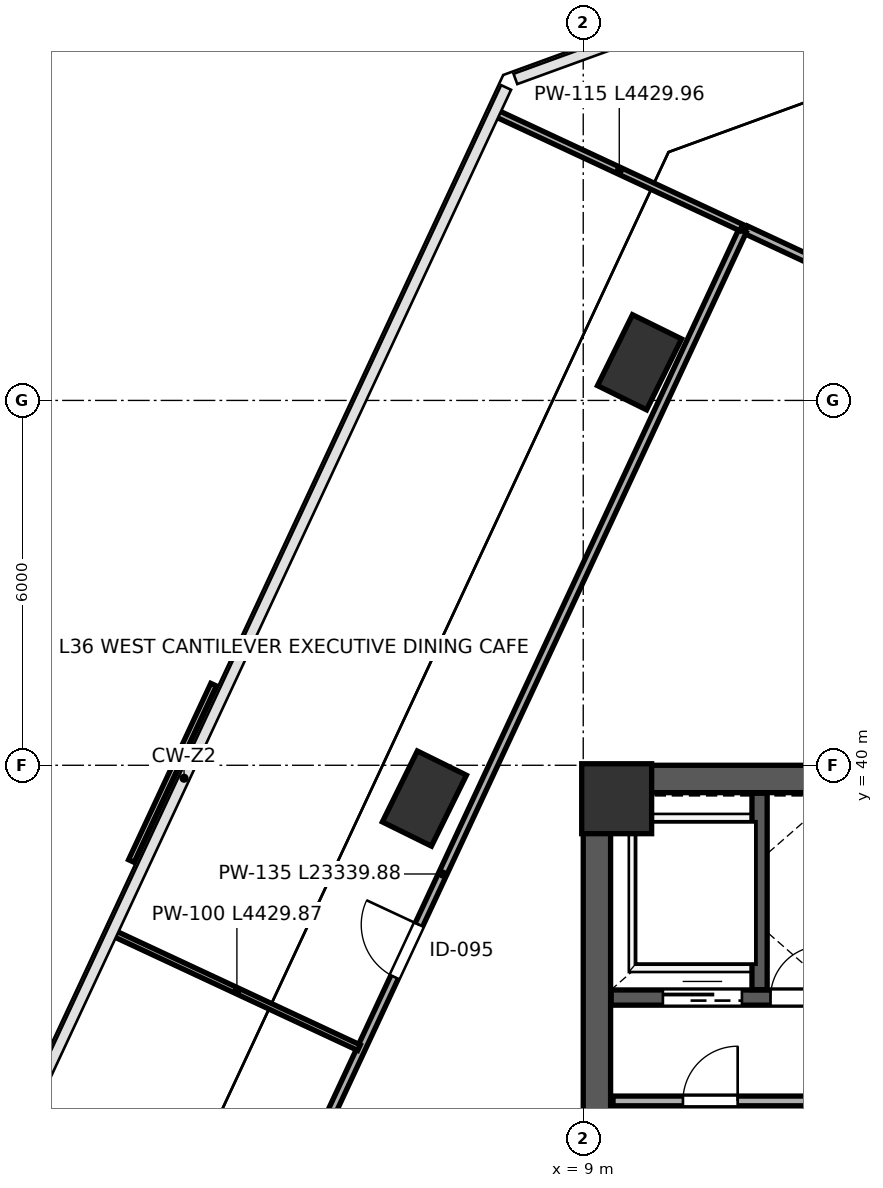
"""IFC4 building model, lengths in metres.
Left out: names, types, materials, properties, quantities, classifications, styles, units other than length and angle.
Written with IfcOpenShell. Run it as: python <this file> out.ifc"""

import sys

from ifc_helpers import new_model, si_unit, direction, frame, frame_2d, origin, origin_2d, place, context, subcontext, project, spatial, rectangle, extrude, clip, halfspace, source, transform, mapped, element, fill, save


model = new_model("IFC4")
c1 = context("Model", 3, precision=1e-05, world=origin(), true_north=direction((0.0, 1.0)))
c2 = subcontext(c1, "Body", "Model", "MODEL_VIEW")
j1 = project(units=[si_unit("LENGTHUNIT", "METRE"), si_unit("PLANEANGLEUNIT", "RADIAN")], contexts=[c1])
p1 = place(None, origin())
s1 = spatial("IfcSite", under=j1, at=p1, CompositionType="ELEMENT")
p2 = place(p1, origin())
s2 = spatial("IfcBuilding", under=s1, at=p2, CompositionType="ELEMENT")
p3 = place(p2, frame((0.0, 0.0, 162.4)))
s3 = spatial("IfcBuildingStorey", under=s2, at=p3, CompositionType="ELEMENT", Elevation=162.4)
m1 = source(origin(), c2, "Body", "SweptSolid", [
    extrude(rectangle(XDim=1.15, YDim=1.15, at=origin_2d()), origin(), (0.0, 0.0, 1.0), 4.199),
])
p4 = place(p3, frame((9.55, 39.45, 0.001), z_axis=(0.0, 0.0, 1.0), x_axis=(1.0, 0.0, 0.0)))
e1 = element("IfcColumn", 1, at=p4, inside=s3, PredefinedType="COLUMN", context=c2, shape_type="MappedRepresentation", body=[
    mapped(m1, transform((0.0, 0.0, 0.0), scale=1.0)),
])
p5 = place(p3, frame((6.388, 39.453, 0.0), z_axis=(0.039433062508, 0.077765936782, 0.99619149397), x_axis=(0.600646384242, -0.79858419972, 0.038564193941)))
e2 = element("IfcColumn", 2, at=p5, inside=s3, PredefinedType="PILASTER", context=c2, shape_type="Clipping", body=[
    clip(clip(extrude(rectangle(XDim=0.9, YDim=1.3, at=origin_2d()), origin(), (0.0, 0.0, 1.0), 4.216), halfspace(frame((0.0, 0.0, 0.069), z_axis=(0.0, 0.0, -1.0), x_axis=(1.0, 0.0, 0.0)), False)), halfspace(frame((0.0, 0.0, 4.147), z_axis=(0.0, 0.0, 1.0), x_axis=(1.0, 0.0, 0.0)), False)),
])
p6 = place(p3, frame((9.926, 46.627, 0.0), z_axis=(0.076252876943, 0.059069944885, 0.995337249564), x_axis=(0.201228472882, -0.978614892024, 0.042661397204)))
e3 = element("IfcColumn", 3, at=p6, inside=s3, PredefinedType="PILASTER", context=c2, shape_type="Clipping", body=[
    clip(clip(extrude(rectangle(XDim=0.9, YDim=1.3, at=origin_2d()), origin(), (0.0, 0.0, 1.0), 4.22), halfspace(frame((0.0, 0.0, 0.076), z_axis=(0.0, 0.0, -1.0), x_axis=(1.0, 0.0, 0.0)), False)), halfspace(frame((0.0, 0.0, 4.144), z_axis=(0.0, 0.0, 1.0), x_axis=(1.0, 0.0, 0.0)), False)),
])
p7 = place(p3, frame((9.225, 24.45, 0.0), z_axis=(0.0, 0.0, 1.0), x_axis=(0.0, 1.0, 0.0)))
e4 = element("IfcWall", 4, at=p7, inside=s3, PredefinedType="SHEAR", context=c2, shape_type="SweptSolid", body=[
    extrude(rectangle(XDim=15.1, YDim=0.45, at=frame_2d((7.55, 0.0))), origin(), (0.0, 0.0, 1.0), 3.96),
])
p8 = place(p3, frame((9.0, 39.775, 0.0), z_axis=(0.0, 0.0, 1.0), x_axis=(1.0, 0.0, 0.0)))
e5 = element("IfcWall", 5, at=p8, inside=s3, PredefinedType="SHEAR", context=c2, shape_type="SweptSolid", body=[
    extrude(rectangle(XDim=18.0, YDim=0.45, at=frame_2d((9.0, 0.0))), origin(), (0.0, 0.0, 1.0), 3.96),
])
p9 = place(p3, frame((9.46, 36.18, 0.0), z_axis=(0.0, 0.0, 1.0), x_axis=(1.0, 0.0, 0.0)))
e6 = element("IfcWall", 6, at=p9, inside=s3, PredefinedType="SHEAR", context=c2, shape_type="SweptSolid", body=[
    extrude(rectangle(XDim=3.79, YDim=0.25, at=frame_2d((1.895, 0.0))), origin(), (0.0, 0.0, 1.0), 3.96),
])
p10 = place(p9, frame((2.62, 0.0, 0.0)))
e7 = element("IfcOpeningElement", 7, at=p10, cuts=e6, PredefinedType="OPENING", context=c2, shape_type="SweptSolid", body=[
    extrude(rectangle(XDim=0.85, YDim=2.1, at=frame_2d((0.425, 1.05))), frame((0.0, 0.135, 0.0), z_axis=(0.0, -1.0, 0.0), x_axis=(1.0, 0.0, 0.0)), (0.0, 0.0, 1.0), 0.27),
])
p11 = place(p9, frame((0.85, 0.0, 0.0)))
e8 = element("IfcOpeningElement", 8, at=p11, cuts=e6, PredefinedType="OPENING", context=c2, shape_type="SweptSolid", body=[
    extrude(rectangle(XDim=1.3, YDim=2.25, at=frame_2d((0.65, 1.125))), frame((0.0, 0.135, 0.0), z_axis=(0.0, -1.0, 0.0), x_axis=(1.0, 0.0, 0.0)), (0.0, 0.0, 1.0), 0.27),
])
p12 = place(p3, frame((11.9, 36.31, 0.0), z_axis=(0.0, 0.0, 1.0), x_axis=(0.0, 1.0, 0.0)))
e9 = element("IfcWall", 9, at=p12, inside=s3, PredefinedType="SHEAR", context=c2, shape_type="SweptSolid", body=[
    extrude(rectangle(XDim=3.23, YDim=0.25, at=frame_2d((1.615, 0.0))), origin(), (0.0, 0.0, 1.0), 3.96),
])
p13 = place(p3, frame((9.49, 34.48, 0.0), z_axis=(0.0, 0.0, 1.0), x_axis=(1.0, 0.0, 0.0)))
e10 = element("IfcWall", 10, at=p13, inside=s3, PredefinedType="PARTITIONING", context=c2, shape_type="SweptSolid", body=[
    extrude(rectangle(XDim=3.7, YDim=0.16, at=frame_2d((1.85, 0.0))), origin(), (0.0, 0.0, 1.0), 3.96),
])
p14 = place(p13, frame((1.15, 0.0, 0.0)))
e11 = element("IfcOpeningElement", 11, at=p14, cuts=e10, PredefinedType="OPENING", context=c2, shape_type="SweptSolid", body=[
    extrude(rectangle(XDim=0.9, YDim=2.15, at=frame_2d((0.45, 1.075))), frame((0.0, 0.09, 0.0), z_axis=(0.0, -1.0, 0.0), x_axis=(1.0, 0.0, 0.0)), (0.0, 0.0, 1.0), 0.18),
])
p15 = place(p3, frame((11.673, 48.808, 0.0), z_axis=(0.0, 0.0, 1.0), x_axis=(0.906307085664, -0.422619765836, 0.0)))
e12 = element("IfcWall", 12, at=p15, inside=s3, PredefinedType="PARTITIONING", context=c2, shape_type="SweptSolid", body=[
    extrude(rectangle(XDim=26.31, YDim=0.135, at=frame_2d((13.155, 0.0))), origin(), (0.0, 0.0, 1.0), 3.96),
])
p16 = place(p15, frame((2.1, 0.0, 0.0)))
e13 = element("IfcOpeningElement", 13, at=p16, cuts=e12, PredefinedType="OPENING", context=c2, shape_type="SweptSolid", body=[
    extrude(rectangle(XDim=0.95, YDim=2.15, at=frame_2d((0.475, 1.075))), frame((0.0, 0.078, 0.0), z_axis=(0.0, -1.0, 0.0), x_axis=(1.0, 0.0, 0.0)), (0.0, 0.0, 1.0), 0.155),
])
p17 = place(p15, frame((18.2, 0.0, 0.0)))
e14 = element("IfcOpeningElement", 14, at=p17, cuts=e12, PredefinedType="OPENING", context=c2, shape_type="SweptSolid", body=[
    extrude(rectangle(XDim=0.95, YDim=2.15, at=frame_2d((0.475, 1.075))), frame((0.0, 0.078, 0.0), z_axis=(0.0, -1.0, 0.0), x_axis=(1.0, 0.0, 0.0)), (0.0, 0.0, 1.0), 0.155),
])
p18 = place(p3, frame((1.756, 27.635, 0.0), z_axis=(0.0, 0.0, 1.0), x_axis=(0.422615732035, 0.906308966653, 0.0)))
e15 = element("IfcWall", 15, at=p18, inside=s3, PredefinedType="PARTITIONING", context=c2, shape_type="SweptSolid", body=[
    extrude(rectangle(XDim=23.34, YDim=0.135, at=frame_2d((11.67, 0.0))), origin(), (0.0, 0.0, 1.0), 3.96),
])
p19 = place(p18, frame((1.7, 0.0, 0.0)))
e16 = element("IfcOpeningElement", 16, at=p19, cuts=e15, PredefinedType="OPENING", context=c2, shape_type="SweptSolid", body=[
    extrude(rectangle(XDim=0.95, YDim=2.15, at=frame_2d((0.475, 1.075))), frame((0.0, 0.078, 0.0), z_axis=(0.0, -1.0, 0.0), x_axis=(1.0, 0.0, 0.0)), (0.0, 0.0, 1.0), 0.155),
])
p20 = place(p18, frame((9.8, 0.0, 0.0)))
e17 = element("IfcOpeningElement", 17, at=p20, cuts=e15, PredefinedType="OPENING", context=c2, shape_type="SweptSolid", body=[
    extrude(rectangle(XDim=0.95, YDim=2.15, at=frame_2d((0.475, 1.075))), frame((0.0, 0.078, 0.0), z_axis=(0.0, -1.0, 0.0), x_axis=(1.0, 0.0, 0.0)), (0.0, 0.0, 1.0), 0.155),
])
p21 = place(p3, frame((7.585, 50.714, 0.0), z_axis=(0.0, 0.0, 1.0), x_axis=(0.906295742894, -0.422644089526, 0.0)))
e18 = element("IfcWall", 18, at=p21, inside=s3, PredefinedType="PARTITIONING", context=c2, shape_type="SweptSolid", body=[
    extrude(rectangle(XDim=4.43, YDim=0.115, at=frame_2d((2.215, 0.0))), origin(), (0.0, 0.0, 1.0), 3.96),
])
p22 = place(p3, frame((1.297, 37.228, 0.0), z_axis=(0.0, 0.0, 1.0), x_axis=(0.906295742894, -0.422644089526, 0.0)))
e19 = element("IfcWall", 19, at=p22, inside=s3, PredefinedType="PARTITIONING", context=c2, shape_type="SweptSolid", body=[
    extrude(rectangle(XDim=4.43, YDim=0.1, at=frame_2d((2.215, 0.0))), origin(), (0.0, 0.0, 1.0), 3.195),
])
m2 = source(origin(), c2, "Body", "SweptSolid", [
    extrude(rectangle(XDim=0.85, YDim=2.1, at=frame_2d((0.425, 1.05))), frame((0.0, 0.025, 0.0), z_axis=(0.0, -1.0, 0.0), x_axis=(1.0, 0.0, 0.0)), (0.0, 0.0, 1.0), 0.05),
])
p23 = place(p10, origin())
e20 = element("IfcDoor", 20, at=p23, inside=s3, OperationType="SINGLE_SWING_RIGHT", PredefinedType="DOOR", context=c2, shape_type="MappedRepresentation", body=[
    mapped(m2, transform((0.0, 0.0, 0.0), scale=1.0)),
])
fill(e7, e20)
m3 = source(origin(), c2, "Body", "SweptSolid", [
    extrude(rectangle(XDim=1.3, YDim=2.25, at=frame_2d((0.65, 1.125))), frame((0.0, 0.025, 0.0), z_axis=(0.0, -1.0, 0.0), x_axis=(1.0, 0.0, 0.0)), (0.0, 0.0, 1.0), 0.05),
])
p24 = place(p11, origin())
e21 = element("IfcDoor", 21, at=p24, inside=s3, OperationType="SLIDING_TO_LEFT", PredefinedType="DOOR", context=c2, shape_type="MappedRepresentation", body=[
    mapped(m3, transform((0.0, 0.0, 0.0), scale=1.0)),
])
fill(e8, e21)
m4 = source(origin(), c2, "Body", "SweptSolid", [
    extrude(rectangle(XDim=0.9, YDim=2.15, at=frame_2d((0.45, 1.075))), frame((0.0, 0.025, 0.0), z_axis=(0.0, -1.0, 0.0), x_axis=(1.0, 0.0, 0.0)), (0.0, 0.0, 1.0), 0.05),
])
p25 = place(p14, origin())
e22 = element("IfcDoor", 22, at=p25, inside=s3, OperationType="SINGLE_SWING_RIGHT", PredefinedType="DOOR", context=c2, shape_type="MappedRepresentation", body=[
    mapped(m4, transform((0.0, 0.0, 0.0), scale=1.0)),
])
fill(e11, e22)
m5 = source(origin(), c2, "Body", "SweptSolid", [
    extrude(rectangle(XDim=0.95, YDim=2.15, at=frame_2d((0.475, 1.075))), frame((0.0, 0.025, 0.0), z_axis=(0.0, -1.0, 0.0), x_axis=(1.0, 0.0, 0.0)), (0.0, 0.0, 1.0), 0.05),
])
p26 = place(p20, origin())
e23 = element("IfcDoor", 23, at=p26, inside=s3, OperationType="SINGLE_SWING_RIGHT", PredefinedType="DOOR", context=c2, shape_type="MappedRepresentation", body=[
    mapped(m5, transform((0.0, 0.0, 0.0), scale=1.0)),
])
fill(e17, e23)
save(model, sys.argv[1])
